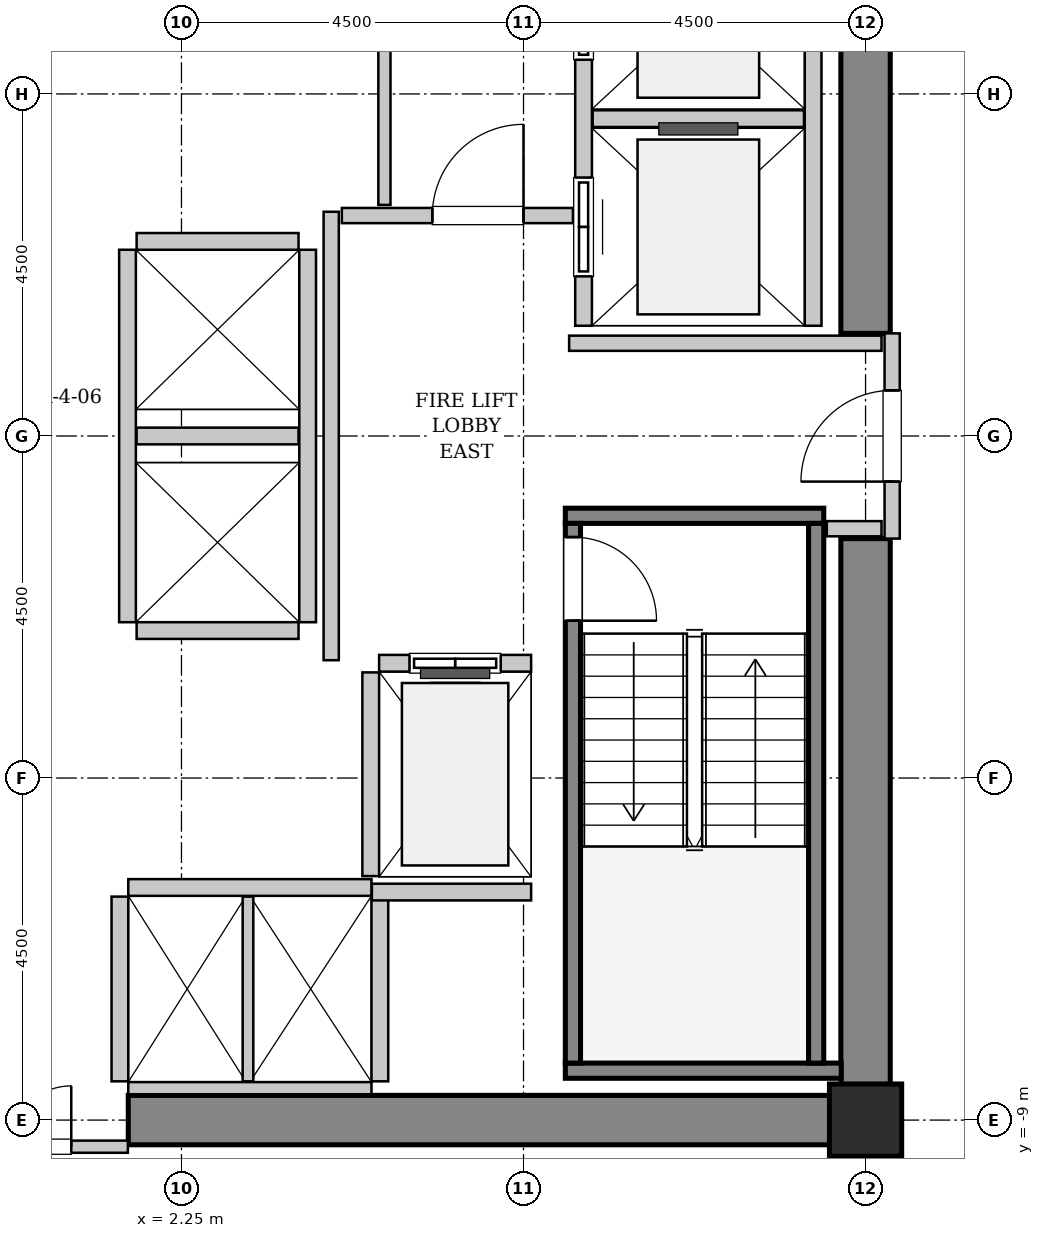
"""IFC4 building model, lengths in metres.
Left out: names, types, materials, properties, quantities, classifications, styles, units other than length and angle.
Written with IfcOpenShell. Run it as: python <this file> out.ifc"""

import sys

from ifc_helpers import new_model, si_unit, direction, frame, frame_2d, origin, origin_2d, place, context, subcontext, project, spatial, rectangle, hollow_rectangle, extrude, source, transform, mapped, element, fill, save


model = new_model("IFC4")
c1 = context("Model", 3, precision=1e-05, world=origin(), true_north=direction((0.0, 1.0)))
c2 = subcontext(c1, "Body", "Model", "MODEL_VIEW")
j1 = project(units=[si_unit("LENGTHUNIT", "METRE"), si_unit("PLANEANGLEUNIT", "RADIAN")], contexts=[c1])
p1 = place(None, origin())
s1 = spatial("IfcSite", under=j1, at=p1, CompositionType="ELEMENT")
p2 = place(p1, origin())
s2 = spatial("IfcBuilding", under=s1, at=p2, CompositionType="ELEMENT")
p3 = place(p2, frame((0.0, 0.0, 52.0)))
s3 = spatial("IfcBuildingStorey", under=s2, at=p3, CompositionType="ELEMENT", Elevation=52.0)
m1 = source(origin(), c2, "Body", "SweptSolid", [
    extrude(rectangle(XDim=10.025, YDim=0.65, at=frame_2d((5.012, 0.0))), origin(), (0.0, 0.0, 1.0), 3.8),
])
p4 = place(p3, frame((1.55, -9.0, 0.0), z_axis=(0.0, 0.0, 1.0), x_axis=(1.0, 0.0, 0.0)))
e1 = element("IfcWall", 1, at=p4, inside=s3, PredefinedType="SHEAR", context=c2, shape_type="MappedRepresentation", body=[
    mapped(m1, transform((0.0, 0.0, 0.0), x_axis=(1.0, 0.0, 0.0), y_axis=(0.0, 1.0, 0.0), z_axis=(0.0, 0.0, 1.0), scale=1.0)),
])
m2 = source(origin(), c2, "Body", "SweptSolid", [
    extrude(rectangle(XDim=7.325, YDim=0.65, at=frame_2d((3.663, 0.0))), origin(), (0.0, 0.0, 1.0), 3.8),
])
for number, where, z_axis, x_axis in (
    (2, (11.25, -8.675, 0.0), (0.0, 0.0, 1.0), (0.0, 1.0, 0.0)),
    (3, (11.25, 1.35, 0.0), (0.0, 0.0, 1.0), (0.0, 1.0, 0.0)),
):
    element("IfcWall", number, at=place(p3, frame(where, z_axis=z_axis, x_axis=x_axis)), inside=s3, PredefinedType="SHEAR", context=c2, shape_type="MappedRepresentation", body=[
        mapped(m2, transform((0.0, 0.0, 0.0), x_axis=(1.0, 0.0, 0.0), y_axis=(0.0, 1.0, 0.0), z_axis=(0.0, 0.0, 1.0), scale=1.0)),
    ])
m3 = source(origin(), c2, "Body", "SweptSolid", [
    extrude(hollow_rectangle(XDim=0.95, YDim=0.95, WallThickness=0.045, InnerFilletRadius=0.045, OuterFilletRadius=0.09, at=origin_2d()), origin(), (0.0, 0.0, 1.0), 3.8),
])
p5 = place(p3, frame((11.25, -9.0, 0.0), z_axis=(0.0, 0.0, 1.0), x_axis=(1.0, 0.0, 0.0)))
e4 = element("IfcColumn", 4, at=p5, inside=s3, PredefinedType="COLUMN", context=c2, shape_type="MappedRepresentation", body=[
    mapped(m3, transform((0.0, 0.0, 0.0), x_axis=(1.0, 0.0, 0.0), y_axis=(0.0, 1.0, 0.0), z_axis=(0.0, 0.0, 1.0), scale=1.0)),
])
m4 = source(origin(), c2, "Body", "SweptSolid", [
    extrude(rectangle(XDim=3.4, YDim=0.2, at=frame_2d((1.7, 0.0))), origin(), (0.0, 0.0, 1.0), 3.8),
])
p6 = place(p3, frame((7.3, -1.05, 0.0), z_axis=(0.0, 0.0, 1.0), x_axis=(1.0, 0.0, 0.0)))
e5 = element("IfcWall", 5, at=p6, inside=s3, PredefinedType="SOLIDWALL", context=c2, shape_type="MappedRepresentation", body=[
    mapped(m4, transform((0.0, 0.0, 0.0), x_axis=(1.0, 0.0, 0.0), y_axis=(0.0, 1.0, 0.0), z_axis=(0.0, 0.0, 1.0), scale=1.0)),
])
m5 = source(origin(), c2, "Body", "SweptSolid", [
    extrude(rectangle(XDim=3.63, YDim=0.2, at=frame_2d((1.815, 0.0))), origin(), (0.0, 0.0, 1.0), 3.8),
])
p7 = place(p3, frame((7.3, -8.35, 0.0), z_axis=(0.0, 0.0, 1.0), x_axis=(1.0, 0.0, 0.0)))
e6 = element("IfcWall", 6, at=p7, inside=s3, PredefinedType="SOLIDWALL", context=c2, shape_type="MappedRepresentation", body=[
    mapped(m5, transform((0.0, 0.0, 0.0), x_axis=(1.0, 0.0, 0.0), y_axis=(0.0, 1.0, 0.0), z_axis=(0.0, 0.0, 1.0), scale=1.0)),
])
m6 = source(origin(), c2, "Body", "SweptSolid", [
    extrude(rectangle(XDim=7.1, YDim=0.2, at=frame_2d((3.55, 0.0))), origin(), (0.0, 0.0, 1.0), 3.8),
])
p8 = place(p3, frame((7.4, -1.15, 0.0), z_axis=(0.0, 0.0, 1.0), x_axis=(0.0, -1.0, 0.0)))
e7 = element("IfcWall", 7, at=p8, inside=s3, PredefinedType="SOLIDWALL", context=c2, shape_type="MappedRepresentation", body=[
    mapped(m6, transform((0.0, 0.0, 0.0), x_axis=(1.0, 0.0, 0.0), y_axis=(0.0, 1.0, 0.0), z_axis=(0.0, 0.0, 1.0), scale=1.0)),
])
p9 = place(p8, frame((0.18, 0.0, 0.0)))
e8 = element("IfcOpeningElement", 8, at=p9, cuts=e7, PredefinedType="OPENING", context=c2, shape_type="SweptSolid", body=[
    extrude(rectangle(XDim=1.1, YDim=2.15, at=frame_2d((0.55, 1.075))), frame((0.0, 0.11, 0.0), z_axis=(0.0, -1.0, 0.0), x_axis=(1.0, 0.0, 0.0)), (0.0, 0.0, 1.0), 0.22),
])
p10 = place(p3, frame((10.6, -1.15, 0.0), z_axis=(0.0, 0.0, 1.0), x_axis=(0.0, -1.0, 0.0)))
e9 = element("IfcWall", 9, at=p10, inside=s3, PredefinedType="SOLIDWALL", context=c2, shape_type="MappedRepresentation", body=[
    mapped(m6, transform((0.0, 0.0, 0.0), x_axis=(1.0, 0.0, 0.0), y_axis=(0.0, 1.0, 0.0), z_axis=(0.0, 0.0, 1.0), scale=1.0)),
])
m7 = source(origin(), c2, "Body", "SweptSolid", [
    extrude(rectangle(XDim=2.0, YDim=0.22, at=frame_2d((1.0, 0.0))), origin(), (0.0, 0.0, 1.0), 3.535),
])
p11 = place(p3, frame((6.85, -2.99, 0.0), z_axis=(0.0, 0.0, 1.0), x_axis=(-1.0, 0.0, 0.0)))
e10 = element("IfcWall", 10, at=p11, inside=s3, PredefinedType="SOLIDWALL", context=c2, shape_type="MappedRepresentation", body=[
    mapped(m7, transform((0.0, 0.0, 0.0), x_axis=(1.0, 0.0, 0.0), y_axis=(0.0, 1.0, 0.0), z_axis=(0.0, 0.0, 1.0), scale=1.0)),
])
p12 = place(p11, frame((0.4, 0.0, 0.0)))
e11 = element("IfcOpeningElement", 11, at=p12, cuts=e10, PredefinedType="OPENING", context=c2, shape_type="SweptSolid", body=[
    extrude(rectangle(XDim=1.2, YDim=2.2, at=frame_2d((0.6, 1.1))), frame((0.0, 0.12, 0.0), z_axis=(0.0, -1.0, 0.0), x_axis=(1.0, 0.0, 0.0)), (0.0, 0.0, 1.0), 0.24),
])
m8 = source(origin(), c2, "Body", "SweptSolid", [
    extrude(rectangle(XDim=2.68, YDim=0.22, at=frame_2d((1.34, 0.0))), origin(), (0.0, 0.0, 1.0), 3.535),
])
p13 = place(p3, frame((4.74, -3.11, 0.0), z_axis=(0.0, 0.0, 1.0), x_axis=(0.0, -1.0, 0.0)))
e12 = element("IfcWall", 12, at=p13, inside=s3, PredefinedType="SOLIDWALL", context=c2, shape_type="MappedRepresentation", body=[
    mapped(m8, transform((0.0, 0.0, 0.0), x_axis=(1.0, 0.0, 0.0), y_axis=(0.0, 1.0, 0.0), z_axis=(0.0, 0.0, 1.0), scale=1.0)),
])
m9 = source(origin(), c2, "Body", "SweptSolid", [
    extrude(rectangle(XDim=5.45, YDim=0.22, at=frame_2d((2.725, 0.0))), origin(), (0.0, 0.0, 1.0), 3.535),
])
p14 = place(p3, frame((7.54, 6.9, 0.0), z_axis=(0.0, 0.0, 1.0), x_axis=(0.0, -1.0, 0.0)))
e13 = element("IfcWall", 13, at=p14, inside=s3, PredefinedType="SOLIDWALL", context=c2, shape_type="MappedRepresentation", body=[
    mapped(m9, transform((0.0, 0.0, 0.0), x_axis=(1.0, 0.0, 0.0), y_axis=(0.0, 1.0, 0.0), z_axis=(0.0, 0.0, 1.0), scale=1.0)),
])
p15 = place(p14, frame((3.5, 0.0, 0.0)))
e14 = element("IfcOpeningElement", 14, at=p15, cuts=e13, PredefinedType="OPENING", context=c2, shape_type="SweptSolid", body=[
    extrude(rectangle(XDim=1.3, YDim=2.3, at=frame_2d((0.65, 1.15))), frame((0.0, 0.12, 0.0), z_axis=(0.0, -1.0, 0.0), x_axis=(1.0, 0.0, 0.0)), (0.0, 0.0, 1.0), 0.24),
])
p16 = place(p14, frame((0.65, 0.0, 0.0)))
e15 = element("IfcOpeningElement", 15, at=p16, cuts=e13, PredefinedType="OPENING", context=c2, shape_type="SweptSolid", body=[
    extrude(rectangle(XDim=1.3, YDim=2.3, at=frame_2d((0.65, 1.15))), frame((0.0, 0.12, 0.0), z_axis=(0.0, -1.0, 0.0), x_axis=(1.0, 0.0, 0.0)), (0.0, 0.0, 1.0), 0.24),
])
p17 = place(p3, frame((10.56, 1.45, 0.0), z_axis=(0.0, 0.0, 1.0), x_axis=(0.0, 1.0, 0.0)))
e16 = element("IfcWall", 16, at=p17, inside=s3, PredefinedType="SOLIDWALL", context=c2, shape_type="MappedRepresentation", body=[
    mapped(m9, transform((0.0, 0.0, 0.0), x_axis=(1.0, 0.0, 0.0), y_axis=(0.0, 1.0, 0.0), z_axis=(0.0, 0.0, 1.0), scale=1.0)),
])
m10 = source(origin(), c2, "Body", "SweptSolid", [
    extrude(rectangle(XDim=2.78, YDim=0.22, at=frame_2d((1.39, 0.0))), origin(), (0.0, 0.0, 1.0), 3.535),
])
p18 = place(p3, frame((7.66, 4.175, 0.0), z_axis=(0.0, 0.0, 1.0), x_axis=(1.0, 0.0, 0.0)))
e17 = element("IfcWall", 17, at=p18, inside=s3, PredefinedType="SOLIDWALL", context=c2, shape_type="MappedRepresentation", body=[
    mapped(m10, transform((0.0, 0.0, 0.0), x_axis=(1.0, 0.0, 0.0), y_axis=(0.0, 1.0, 0.0), z_axis=(0.0, 0.0, 1.0), scale=1.0)),
])
m11 = source(origin(), c2, "Body", "SweptSolid", [
    extrude(rectangle(XDim=3.2, YDim=0.22, at=frame_2d((1.6, 0.0))), origin(), (0.0, 0.0, 1.0), 3.535),
])
p19 = place(p3, frame((4.75, -5.94, 0.0), z_axis=(0.0, 0.0, 1.0), x_axis=(-1.0, 0.0, 0.0)))
e18 = element("IfcWall", 18, at=p19, inside=s3, PredefinedType="SOLIDWALL", context=c2, shape_type="MappedRepresentation", body=[
    mapped(m11, transform((0.0, 0.0, 0.0), x_axis=(1.0, 0.0, 0.0), y_axis=(0.0, 1.0, 0.0), z_axis=(0.0, 0.0, 1.0), scale=1.0)),
])
m12 = source(origin(), c2, "Body", "SweptSolid", [
    extrude(rectangle(XDim=3.2, YDim=0.16, at=frame_2d((1.6, 0.0))), origin(), (0.0, 0.0, 1.0), 2.425),
])
p20 = place(p3, frame((1.55, -8.58, 0.0), z_axis=(0.0, 0.0, 1.0), x_axis=(1.0, 0.0, 0.0)))
e19 = element("IfcWall", 19, at=p20, inside=s3, PredefinedType="PARTITIONING", context=c2, shape_type="MappedRepresentation", body=[
    mapped(m12, transform((0.0, 0.0, 0.0), x_axis=(1.0, 0.0, 0.0), y_axis=(0.0, 1.0, 0.0), z_axis=(0.0, 0.0, 1.0), scale=1.0)),
])
m13 = source(origin(), c2, "Body", "SweptSolid", [
    extrude(rectangle(XDim=2.43, YDim=0.22, at=frame_2d((1.215, 0.0))), origin(), (0.0, 0.0, 1.0), 3.535),
])
p21 = place(p3, frame((1.44, -6.06, 0.0), z_axis=(0.0, 0.0, 1.0), x_axis=(0.0, -1.0, 0.0)))
e20 = element("IfcWall", 20, at=p21, inside=s3, PredefinedType="SOLIDWALL", context=c2, shape_type="MappedRepresentation", body=[
    mapped(m13, transform((0.0, 0.0, 0.0), x_axis=(1.0, 0.0, 0.0), y_axis=(0.0, 1.0, 0.0), z_axis=(0.0, 0.0, 1.0), scale=1.0)),
])
m14 = source(origin(), c2, "Body", "SweptSolid", [
    extrude(rectangle(XDim=2.43, YDim=0.14, at=frame_2d((1.215, 0.0))), origin(), (0.0, 0.0, 1.0), 3.535),
])
p22 = place(p3, frame((3.125, -8.49, 0.0), z_axis=(0.0, 0.0, 1.0), x_axis=(0.0, 1.0, 0.0)))
e21 = element("IfcWall", 21, at=p22, inside=s3, PredefinedType="PARTITIONING", context=c2, shape_type="MappedRepresentation", body=[
    mapped(m14, transform((0.0, 0.0, 0.0), x_axis=(1.0, 0.0, 0.0), y_axis=(0.0, 1.0, 0.0), z_axis=(0.0, 0.0, 1.0), scale=1.0)),
])
p23 = place(p3, frame((4.86, -8.49, 0.0), z_axis=(0.0, 0.0, 1.0), x_axis=(0.0, 1.0, 0.0)))
e22 = element("IfcWall", 22, at=p23, inside=s3, PredefinedType="SOLIDWALL", context=c2, shape_type="MappedRepresentation", body=[
    mapped(m13, transform((0.0, 0.0, 0.0), x_axis=(1.0, 0.0, 0.0), y_axis=(0.0, 1.0, 0.0), z_axis=(0.0, 0.0, 1.0), scale=1.0)),
])
m15 = source(origin(), c2, "Body", "SweptSolid", [
    extrude(rectangle(XDim=4.9, YDim=0.22, at=frame_2d((2.45, 0.0))), origin(), (0.0, 0.0, 1.0), 3.535),
])
for number, where, z_axis, x_axis in (
    (23, (1.54, 2.45, 0.0), (0.0, 0.0, 1.0), (0.0, -1.0, 0.0)),
    (24, (3.91, -2.45, 0.0), (0.0, 0.0, 1.0), (0.0, 1.0, 0.0)),
):
    element("IfcWall", number, at=place(p3, frame(where, z_axis=z_axis, x_axis=x_axis)), inside=s3, PredefinedType="SOLIDWALL", context=c2, shape_type="MappedRepresentation", body=[
        mapped(m15, transform((0.0, 0.0, 0.0), x_axis=(1.0, 0.0, 0.0), y_axis=(0.0, 1.0, 0.0), z_axis=(0.0, 0.0, 1.0), scale=1.0)),
    ])
m16 = source(origin(), c2, "Body", "SweptSolid", [
    extrude(rectangle(XDim=2.13, YDim=0.22, at=frame_2d((1.065, 0.0))), origin(), (0.0, 0.0, 1.0), 3.535),
])
for number, where, z_axis, x_axis in (
    (25, (1.66, -2.56, 0.0), (0.0, 0.0, 1.0), (1.0, 0.0, 0.0)),
    (26, (1.66, 0.0, 0.0), (0.0, 0.0, 1.0), (1.0, 0.0, 0.0)),
    (27, (3.79, 2.56, 0.0), (0.0, 0.0, 1.0), (-1.0, 0.0, 0.0)),
):
    element("IfcWall", number, at=place(p3, frame(where, z_axis=z_axis, x_axis=x_axis)), inside=s3, PredefinedType="SOLIDWALL", context=c2, shape_type="MappedRepresentation", body=[
        mapped(m16, transform((0.0, 0.0, 0.0), x_axis=(1.0, 0.0, 0.0), y_axis=(0.0, 1.0, 0.0), z_axis=(0.0, 0.0, 1.0), scale=1.0)),
    ])
m17 = source(origin(), c2, "Body", "SweptSolid", [
    extrude(rectangle(XDim=2.095, YDim=0.22, at=frame_2d((1.048, 0.0))), origin(), (0.0, 0.0, 1.0), 3.535),
])
p24 = place(p3, frame((4.755, -6.0, 0.0), z_axis=(0.0, 0.0, 1.0), x_axis=(1.0, 0.0, 0.0)))
e28 = element("IfcWall", 28, at=p24, inside=s3, PredefinedType="SOLIDWALL", context=c2, shape_type="MappedRepresentation", body=[
    mapped(m17, transform((0.0, 0.0, 0.0), x_axis=(1.0, 0.0, 0.0), y_axis=(0.0, 1.0, 0.0), z_axis=(0.0, 0.0, 1.0), scale=1.0)),
])
m18 = source(origin(), c2, "Body", "SweptSolid", [
    extrude(rectangle(XDim=2.7, YDim=0.2, at=frame_2d((1.35, 0.0))), origin(), (0.0, 0.0, 1.0), 2.425),
])
p25 = place(p3, frame((11.6, -1.35, 0.0), z_axis=(0.0, 0.0, 1.0), x_axis=(0.0, 1.0, 0.0)))
e29 = element("IfcWall", 29, at=p25, inside=s3, PredefinedType="PARTITIONING", context=c2, shape_type="MappedRepresentation", body=[
    mapped(m18, transform((0.0, 0.0, 0.0), x_axis=(1.0, 0.0, 0.0), y_axis=(0.0, 1.0, 0.0), z_axis=(0.0, 0.0, 1.0), scale=1.0)),
])
p26 = place(p25, frame((0.75, 0.0, 0.0)))
e30 = element("IfcOpeningElement", 30, at=p26, cuts=e29, PredefinedType="OPENING", context=c2, shape_type="SweptSolid", body=[
    extrude(rectangle(XDim=1.2, YDim=2.15, at=frame_2d((0.6, 1.075))), frame((0.0, 0.11, 0.0), z_axis=(0.0, -1.0, 0.0), x_axis=(1.0, 0.0, 0.0)), (0.0, 0.0, 1.0), 0.22),
])
m19 = source(origin(), c2, "Body", "SweptSolid", [
    extrude(rectangle(XDim=5.9, YDim=0.2, at=frame_2d((2.95, 0.0))), origin(), (0.0, 0.0, 1.0), 3.535),
])
p27 = place(p3, frame((4.22, -2.95, 0.0), z_axis=(0.0, 0.0, 1.0), x_axis=(0.0, 1.0, 0.0)))
e31 = element("IfcWall", 31, at=p27, inside=s3, PredefinedType="PARTITIONING", context=c2, shape_type="MappedRepresentation", body=[
    mapped(m19, transform((0.0, 0.0, 0.0), x_axis=(1.0, 0.0, 0.0), y_axis=(0.0, 1.0, 0.0), z_axis=(0.0, 0.0, 1.0), scale=1.0)),
])
m20 = source(origin(), c2, "Body", "SweptSolid", [
    extrude(rectangle(XDim=3.04, YDim=0.2, at=frame_2d((1.52, 0.0))), origin(), (0.0, 0.0, 1.0), 3.535),
])
p28 = place(p3, frame((4.36, 2.9, 0.0), z_axis=(0.0, 0.0, 1.0), x_axis=(1.0, 0.0, 0.0)))
e32 = element("IfcWall", 32, at=p28, inside=s3, PredefinedType="PARTITIONING", context=c2, shape_type="MappedRepresentation", body=[
    mapped(m20, transform((0.0, 0.0, 0.0), x_axis=(1.0, 0.0, 0.0), y_axis=(0.0, 1.0, 0.0), z_axis=(0.0, 0.0, 1.0), scale=1.0)),
])
p29 = place(p28, frame((1.19, 0.0, 0.0)))
e33 = element("IfcOpeningElement", 33, at=p29, cuts=e32, PredefinedType="OPENING", context=c2, shape_type="SweptSolid", body=[
    extrude(rectangle(XDim=1.2, YDim=2.15, at=frame_2d((0.6, 1.075))), frame((0.0, 0.11, 0.0), z_axis=(0.0, -1.0, 0.0), x_axis=(1.0, 0.0, 0.0)), (0.0, 0.0, 1.0), 0.22),
])
m21 = source(origin(), c2, "Body", "SweptSolid", [
    extrude(rectangle(XDim=4.11, YDim=0.2, at=frame_2d((2.055, 0.0))), origin(), (0.0, 0.0, 1.0), 3.535),
])
p30 = place(p3, frame((7.35, 1.22, 0.0), z_axis=(0.0, 0.0, 1.0), x_axis=(1.0, 0.0, 0.0)))
e34 = element("IfcWall", 34, at=p30, inside=s3, PredefinedType="PARTITIONING", context=c2, shape_type="MappedRepresentation", body=[
    mapped(m21, transform((0.0, 0.0, 0.0), x_axis=(1.0, 0.0, 0.0), y_axis=(0.0, 1.0, 0.0), z_axis=(0.0, 0.0, 1.0), scale=1.0)),
])
m22 = source(origin(), c2, "Body", "SweptSolid", [
    extrude(rectangle(XDim=0.72, YDim=0.2, at=frame_2d((0.36, 0.0))), origin(), (0.0, 0.0, 1.0), 3.535),
])
p31 = place(p3, frame((10.74, -1.22, 0.0), z_axis=(0.0, 0.0, 1.0), x_axis=(1.0, 0.0, 0.0)))
e35 = element("IfcWall", 35, at=p31, inside=s3, PredefinedType="PARTITIONING", context=c2, shape_type="MappedRepresentation", body=[
    mapped(m22, transform((0.0, 0.0, 0.0), x_axis=(1.0, 0.0, 0.0), y_axis=(0.0, 1.0, 0.0), z_axis=(0.0, 0.0, 1.0), scale=1.0)),
])
m23 = source(origin(), c2, "Body", "SweptSolid", [
    extrude(rectangle(XDim=3.09, YDim=0.16, at=frame_2d((1.545, 0.0))), origin(), (0.0, 0.0, 1.0), 2.425),
])
p32 = place(p3, frame((-1.545, -9.35, 0.0), z_axis=(0.0, 0.0, 1.0), x_axis=(1.0, 0.0, 0.0)))
e36 = element("IfcWall", 36, at=p32, inside=s3, PredefinedType="PARTITIONING", context=c2, shape_type="MappedRepresentation", body=[
    mapped(m23, transform((0.0, 0.0, 0.0), x_axis=(1.0, 0.0, 0.0), y_axis=(0.0, 1.0, 0.0), z_axis=(0.0, 0.0, 1.0), scale=1.0)),
])
p33 = place(p32, frame((0.745, 0.0, 0.0)))
e37 = element("IfcOpeningElement", 37, at=p33, cuts=e36, PredefinedType="OPENING", context=c2, shape_type="SweptSolid", body=[
    extrude(rectangle(XDim=1.6, YDim=2.3, at=frame_2d((0.8, 1.15))), frame((0.0, 0.09, 0.0), z_axis=(0.0, -1.0, 0.0), x_axis=(1.0, 0.0, 0.0)), (0.0, 0.0, 1.0), 0.18),
])
m24 = source(origin(), c2, "Body", "SweptSolid", [
    extrude(rectangle(XDim=3.015, YDim=0.16, at=frame_2d((1.507, 0.0))), origin(), (0.0, 0.0, 1.0), 3.535),
])
p34 = place(p3, frame((4.92, 3.04, 0.0), z_axis=(0.0, 0.0, 1.0), x_axis=(0.0, 1.0, 0.0)))
e38 = element("IfcWall", 38, at=p34, inside=s3, PredefinedType="PARTITIONING", context=c2, shape_type="MappedRepresentation", body=[
    mapped(m24, transform((0.0, 0.0, 0.0), x_axis=(1.0, 0.0, 0.0), y_axis=(0.0, 1.0, 0.0), z_axis=(0.0, 0.0, 1.0), scale=1.0)),
])
m25 = source(origin(), c2, "Body", "SweptSolid", [
    extrude(rectangle(XDim=1.1, YDim=2.15, at=frame_2d((0.55, 1.075))), frame((0.0, 0.025, 0.0), z_axis=(0.0, -1.0, 0.0), x_axis=(1.0, 0.0, 0.0)), (0.0, 0.0, 1.0), 0.05),
])
p35 = place(p9, origin())
e39 = element("IfcDoor", 39, at=p35, inside=s3, OperationType="SINGLE_SWING_RIGHT", PredefinedType="DOOR", context=c2, shape_type="MappedRepresentation", body=[
    mapped(m25, transform((0.0, 0.0, 0.0), x_axis=(1.0, 0.0, 0.0), y_axis=(0.0, 1.0, 0.0), z_axis=(0.0, 0.0, 1.0), scale=1.0)),
])
fill(e8, e39)
m26 = source(origin(), c2, "Body", "SweptSolid", [
    extrude(rectangle(XDim=1.2, YDim=2.2, at=frame_2d((0.6, 1.1))), frame((0.0, 0.025, 0.0), z_axis=(0.0, -1.0, 0.0), x_axis=(1.0, 0.0, 0.0)), (0.0, 0.0, 1.0), 0.05),
])
p36 = place(p12, origin())
e40 = element("IfcDoor", 40, at=p36, inside=s3, OperationType="SLIDING_TO_LEFT", PredefinedType="DOOR", context=c2, shape_type="MappedRepresentation", body=[
    mapped(m26, transform((0.0, 0.0, 0.0), x_axis=(1.0, 0.0, 0.0), y_axis=(0.0, 1.0, 0.0), z_axis=(0.0, 0.0, 1.0), scale=1.0)),
])
fill(e11, e40)
m27 = source(origin(), c2, "Body", "SweptSolid", [
    extrude(rectangle(XDim=1.3, YDim=2.3, at=frame_2d((0.65, 1.15))), frame((0.0, 0.025, 0.0), z_axis=(0.0, -1.0, 0.0), x_axis=(1.0, 0.0, 0.0)), (0.0, 0.0, 1.0), 0.05),
])
p37 = place(p15, origin())
e41 = element("IfcDoor", 41, at=p37, inside=s3, OperationType="SLIDING_TO_RIGHT", PredefinedType="DOOR", context=c2, shape_type="MappedRepresentation", body=[
    mapped(m27, transform((0.0, 0.0, 0.0), x_axis=(1.0, 0.0, 0.0), y_axis=(0.0, 1.0, 0.0), z_axis=(0.0, 0.0, 1.0), scale=1.0)),
])
fill(e14, e41)
p38 = place(p16, origin())
e42 = element("IfcDoor", 42, at=p38, inside=s3, OperationType="SLIDING_TO_RIGHT", PredefinedType="DOOR", context=c2, shape_type="MappedRepresentation", body=[
    mapped(m27, transform((0.0, 0.0, 0.0), x_axis=(1.0, 0.0, 0.0), y_axis=(0.0, 1.0, 0.0), z_axis=(0.0, 0.0, 1.0), scale=1.0)),
])
fill(e15, e42)
m28 = source(origin(), c2, "Body", "SweptSolid", [
    extrude(rectangle(XDim=1.2, YDim=2.15, at=frame_2d((0.6, 1.075))), frame((0.0, 0.025, 0.0), z_axis=(0.0, -1.0, 0.0), x_axis=(1.0, 0.0, 0.0)), (0.0, 0.0, 1.0), 0.05),
])
p39 = place(p26, origin())
e43 = element("IfcDoor", 43, at=p39, inside=s3, OperationType="SINGLE_SWING_LEFT", PredefinedType="DOOR", context=c2, shape_type="MappedRepresentation", body=[
    mapped(m28, transform((0.0, 0.0, 0.0), x_axis=(1.0, 0.0, 0.0), y_axis=(0.0, 1.0, 0.0), z_axis=(0.0, 0.0, 1.0), scale=1.0)),
])
fill(e30, e43)
p40 = place(p29, origin())
e44 = element("IfcDoor", 44, at=p40, inside=s3, OperationType="SINGLE_SWING_RIGHT", PredefinedType="DOOR", context=c2, shape_type="MappedRepresentation", body=[
    mapped(m28, transform((0.0, 0.0, 0.0), x_axis=(1.0, 0.0, 0.0), y_axis=(0.0, 1.0, 0.0), z_axis=(0.0, 0.0, 1.0), scale=1.0)),
])
fill(e33, e44)
m29 = source(origin(), c2, "Body", "SweptSolid", [
    extrude(rectangle(XDim=1.6, YDim=2.3, at=frame_2d((0.8, 1.15))), frame((0.0, 0.025, 0.0), z_axis=(0.0, -1.0, 0.0), x_axis=(1.0, 0.0, 0.0)), (0.0, 0.0, 1.0), 0.05),
])
p41 = place(p33, origin())
e45 = element("IfcDoor", 45, at=p41, inside=s3, OperationType="DOUBLE_DOOR_SINGLE_SWING", PredefinedType="DOOR", context=c2, shape_type="MappedRepresentation", body=[
    mapped(m29, transform((0.0, 0.0, 0.0), x_axis=(1.0, 0.0, 0.0), y_axis=(0.0, 1.0, 0.0), z_axis=(0.0, 0.0, 1.0), scale=1.0)),
])
fill(e37, e45)
save(model, sys.argv[1])
